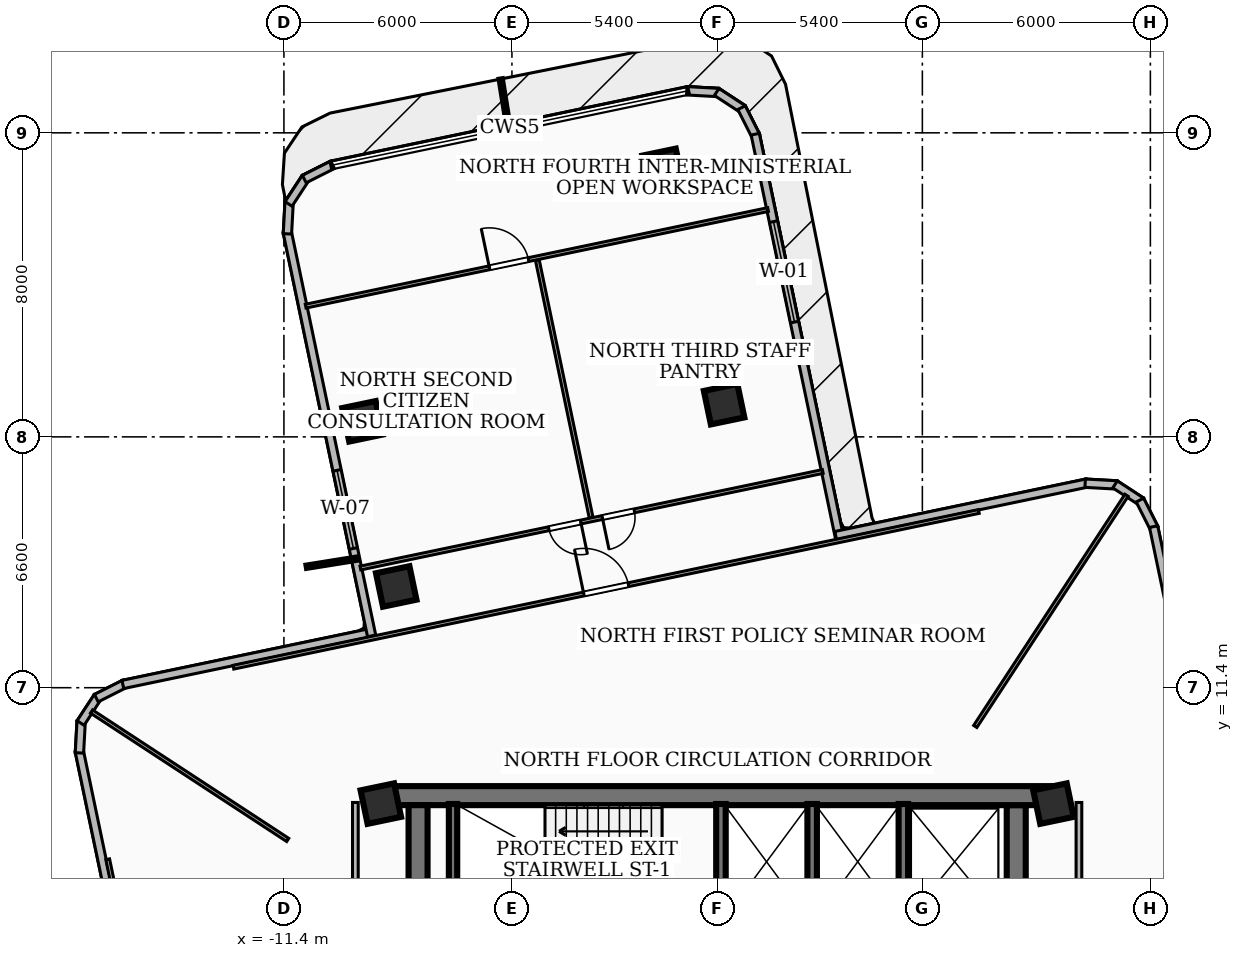
"""IFC4 building model, lengths in metres.
Left out: names, types, materials, properties, quantities, classifications, styles, units other than length and angle.
Written with IfcOpenShell. Run it as: python <this file> out.ifc"""

import sys

from ifc_helpers import new_model, si_unit, direction, frame, frame_2d, origin, origin_2d, place, context, subcontext, project, spatial, rectangle, extrude, element, fill, save


model = new_model("IFC4")
c1 = context("Model", 3, precision=1e-05, world=origin(), true_north=direction((0.0, 1.0)))
c2 = subcontext(c1, "Body", "Model", "MODEL_VIEW")
j1 = project(units=[si_unit("LENGTHUNIT", "METRE"), si_unit("PLANEANGLEUNIT", "RADIAN")], contexts=[c1])
p1 = place(None, origin())
s1 = spatial("IfcSite", under=j1, at=p1, CompositionType="ELEMENT")
p2 = place(p1, origin())
s2 = spatial("IfcBuilding", under=s1, at=p2, CompositionType="ELEMENT")
p3 = place(p2, frame((0.0, 0.0, 111.96)))
s3 = spatial("IfcBuildingStorey", under=s2, at=p3, CompositionType="ELEMENT", Elevation=111.96)
p4 = place(p3, frame((-8.78, 8.56, 0.0), z_axis=(0.0, 0.0, 1.0), x_axis=(1.0, 0.0, 0.0)))
e1 = element("IfcWall", 1, at=p4, inside=s3, PredefinedType="SHEAR", context=c2, shape_type="SweptSolid", body=[
    extrude(rectangle(XDim=17.56, YDim=0.5, at=frame_2d((8.78, 0.0))), origin(), (0.0, 0.0, 1.0), 4.06),
])
for number, where, z_axis, x_axis in (
    (2, (-7.87, 2.0, 0.0), (0.0, 0.0, 1.0), (0.0, 1.0, 0.0)),
    (3, (7.87, 8.31, 0.0), (0.0, 0.0, 1.0), (0.0, -1.0, 0.0)),
):
    element("IfcWall", number, at=place(p3, frame(where, z_axis=z_axis, x_axis=x_axis)), inside=s3, PredefinedType="SHEAR", context=c2, shape_type="SweptSolid", body=[
        extrude(rectangle(XDim=6.31, YDim=0.5, at=frame_2d((3.155, 0.0))), origin(), (0.0, 0.0, 1.0), 4.06),
    ])
p5 = place(p3, frame((-6.95, 5.28, 0.0), z_axis=(0.0, 0.0, 1.0), x_axis=(0.0, 1.0, 0.0)))
e4 = element("IfcWall", 4, at=p5, inside=s3, PredefinedType="SOLIDWALL", context=c2, shape_type="SweptSolid", body=[
    extrude(rectangle(XDim=3.06, YDim=0.22, at=frame_2d((1.53, 0.0))), origin(), (0.0, 0.0, 1.0), 4.06),
])
for number, where, z_axis, x_axis in (
    (5, (0.1, 5.3, 0.0), (0.0, 0.0, 1.0), (0.0, 1.0, 0.0)),
    (6, (2.5, 5.3, 0.0), (0.0, 0.0, 1.0), (0.0, 1.0, 0.0)),
    (7, (4.9, 5.3, 0.0), (0.0, 0.0, 1.0), (0.0, 1.0, 0.0)),
):
    element("IfcWall", number, at=place(p3, frame(where, z_axis=z_axis, x_axis=x_axis)), inside=s3, PredefinedType="SOLIDWALL", context=c2, shape_type="SweptSolid", body=[
        extrude(rectangle(XDim=3.04, YDim=0.25, at=frame_2d((1.52, 0.0))), origin(), (0.0, 0.0, 1.0), 4.06),
    ])
for number, where, z_axis, x_axis in (
    (8, (-8.85, 8.35, 0.0), (0.0, 0.0, 1.0), (0.979, 0.204, 0.0)),
    (9, (8.85, 8.35, 0.0), (0.0, 0.0, 1.0), (0.979, 0.204, 0.0)),
    (10, (0.183, 18.86, 0.0), (0.0, 0.0, 1.0), (0.979, 0.204, 0.0)),
    (11, (-8.445, 14.064, 0.0), (0.0, 0.0, 1.0), (0.979, 0.204, 0.0)),
    (12, (-1.437, 25.052, 0.0), (0.0, 0.0, 1.0), (0.979, 0.204, 0.0)),
    (13, (-9.333, 18.409, 0.0), (0.0, 0.0, 1.0), (0.979, 0.204, 0.0)),
):
    element("IfcColumn", number, at=place(p3, frame(where, z_axis=z_axis, x_axis=x_axis)), inside=s3, PredefinedType="COLUMN", context=c2, shape_type="SweptSolid", body=[
        extrude(rectangle(XDim=0.9, YDim=0.9, at=origin_2d()), origin(), (0.0, 0.0, 1.0), 4.32),
    ])
p6 = place(p3, frame((-15.403, 3.119, 0.0), z_axis=(0.0, 0.0, 1.0), x_axis=(-0.204509735336, 0.978864530031, 0.0)))
e14 = element("IfcWall", 14, at=p6, inside=s3, PredefinedType="SOLIDWALL", context=c2, shape_type="SweptSolid", body=[
    extrude(rectangle(XDim=6.757, YDim=0.22, at=frame_2d((3.378, 0.0))), origin(), (0.0, 0.0, 1.0), 4.06),
])
p7 = place(p3, frame((-16.781, 9.684, 0.0), z_axis=(0.0, 0.0, 1.0), x_axis=(0.055016197793, 0.998485462078, 0.0)))
e15 = element("IfcWall", 15, at=p7, inside=s3, PredefinedType="SOLIDWALL", context=c2, shape_type="SweptSolid", body=[
    extrude(rectangle(XDim=0.834, YDim=0.22, at=frame_2d((0.417, 0.0))), origin(), (0.0, 0.0, 1.0), 4.06),
])
p8 = place(p3, frame((-16.75, 10.471, 0.0), z_axis=(0.0, 0.0, 1.0), x_axis=(0.54760232045, 0.836738727822, 0.0)))
e16 = element("IfcWall", 16, at=p8, inside=s3, PredefinedType="SOLIDWALL", context=c2, shape_type="SweptSolid", body=[
    extrude(rectangle(XDim=0.82, YDim=0.22, at=frame_2d((0.41, 0.0))), origin(), (0.0, 0.0, 1.0), 4.06),
])
p9 = place(p3, frame((-16.337, 11.125, 0.0), z_axis=(0.0, 0.0, 1.0), x_axis=(0.892485652426, 0.45107578101, 0.0)))
e17 = element("IfcWall", 17, at=p9, inside=s3, PredefinedType="SOLIDWALL", context=c2, shape_type="SweptSolid", body=[
    extrude(rectangle(XDim=0.833, YDim=0.22, at=frame_2d((0.417, 0.0))), origin(), (0.0, 0.0, 1.0), 4.06),
])
p10 = place(p3, frame((-15.639, 11.485, 0.0), z_axis=(0.0, 0.0, 1.0), x_axis=(0.978870573598, 0.204480806295, 0.0)))
e18 = element("IfcWall", 18, at=p10, inside=s3, PredefinedType="SOLIDWALL", context=c2, shape_type="SweptSolid", body=[
    extrude(rectangle(XDim=6.758, YDim=0.22, at=frame_2d((3.379, 0.0))), origin(), (0.0, 0.0, 1.0), 4.06),
])
p11 = place(p3, frame((-9.092, 12.763, 0.0), z_axis=(0.0, 0.0, 1.0), x_axis=(-0.204463355867, 0.978874218737, 0.0)))
e19 = element("IfcWall", 19, at=p11, inside=s3, PredefinedType="SOLIDWALL", context=c2, shape_type="SweptSolid", body=[
    extrude(rectangle(XDim=10.858, YDim=0.22, at=frame_2d((5.429, 0.0))), origin(), (0.0, 0.0, 1.0), 4.06),
])
p12 = place(p11, frame((2.35, 0.0, 0.85)))
e20 = element("IfcOpeningElement", 20, at=p12, cuts=e19, PredefinedType="OPENING", context=c2, shape_type="SweptSolid", body=[
    extrude(rectangle(XDim=2.1, YDim=1.8, at=frame_2d((1.05, 0.9))), frame((0.0, 0.12, 0.0), z_axis=(0.0, -1.0, 0.0), x_axis=(1.0, 0.0, 0.0)), (0.0, 0.0, 1.0), 0.24),
])
p13 = place(p3, frame((-11.308, 23.342, 0.0), z_axis=(0.0, 0.0, 1.0), x_axis=(0.05414087393, 0.998533307291, 0.0)))
e21 = element("IfcWall", 21, at=p13, inside=s3, PredefinedType="SOLIDWALL", context=c2, shape_type="SweptSolid", body=[
    extrude(rectangle(XDim=0.834, YDim=0.22, at=frame_2d((0.417, 0.0))), origin(), (0.0, 0.0, 1.0), 4.06),
])
p14 = place(p3, frame((-11.278, 24.129, 0.0), z_axis=(0.0, 0.0, 1.0), x_axis=(0.548643443567, 0.836056440577, 0.0)))
e22 = element("IfcWall", 22, at=p14, inside=s3, PredefinedType="SOLIDWALL", context=c2, shape_type="SweptSolid", body=[
    extrude(rectangle(XDim=0.821, YDim=0.22, at=frame_2d((0.41, 0.0))), origin(), (0.0, 0.0, 1.0), 4.06),
])
p15 = place(p3, frame((-10.864, 24.783, 0.0), z_axis=(0.0, 0.0, 1.0), x_axis=(0.892957084524, 0.450141805655, 0.0)))
e23 = element("IfcWall", 23, at=p15, inside=s3, PredefinedType="SOLIDWALL", context=c2, shape_type="SweptSolid", body=[
    extrude(rectangle(XDim=0.833, YDim=0.22, at=frame_2d((0.417, 0.0))), origin(), (0.0, 0.0, 1.0), 4.06),
])
p16 = place(p3, frame((-0.799, 27.106, 0.0), z_axis=(0.0, 0.0, 1.0), x_axis=(0.998485462078, -0.055016197793, 0.0)))
e24 = element("IfcWall", 24, at=p16, inside=s3, PredefinedType="SOLIDWALL", context=c2, shape_type="SweptSolid", body=[
    extrude(rectangle(XDim=0.834, YDim=0.22, at=frame_2d((0.417, 0.0))), origin(), (0.0, 0.0, 1.0), 4.06),
])
p17 = place(p3, frame((-0.012, 27.075, 0.0), z_axis=(0.0, 0.0, 1.0), x_axis=(0.836738727822, -0.54760232045, 0.0)))
e25 = element("IfcWall", 25, at=p17, inside=s3, PredefinedType="SOLIDWALL", context=c2, shape_type="SweptSolid", body=[
    extrude(rectangle(XDim=0.82, YDim=0.22, at=frame_2d((0.41, 0.0))), origin(), (0.0, 0.0, 1.0), 4.06),
])
p18 = place(p3, frame((0.642, 26.662, 0.0), z_axis=(0.0, 0.0, 1.0), x_axis=(0.450957890046, -0.892545226532, 0.0)))
e26 = element("IfcWall", 26, at=p18, inside=s3, PredefinedType="SOLIDWALL", context=c2, shape_type="SweptSolid", body=[
    extrude(rectangle(XDim=0.834, YDim=0.22, at=frame_2d((0.417, 0.0))), origin(), (0.0, 0.0, 1.0), 4.06),
])
p19 = place(p3, frame((1.002, 25.964, 0.0), z_axis=(0.0, 0.0, 1.0), x_axis=(0.204531529625, -0.978859976396, 0.0)))
e27 = element("IfcWall", 27, at=p19, inside=s3, PredefinedType="SOLIDWALL", context=c2, shape_type="SweptSolid", body=[
    extrude(rectangle(XDim=10.859, YDim=0.22, at=frame_2d((5.429, 0.0))), origin(), (0.0, 0.0, 1.0), 3.29),
])
p20 = place(p19, frame((2.35, 0.0, 0.85)))
e28 = element("IfcOpeningElement", 28, at=p20, cuts=e27, PredefinedType="OPENING", context=c2, shape_type="SweptSolid", body=[
    extrude(rectangle(XDim=2.7, YDim=2.1, at=frame_2d((1.35, 1.05))), frame((0.0, 0.12, 0.0), z_axis=(0.0, -1.0, 0.0), x_axis=(1.0, 0.0, 0.0)), (0.0, 0.0, 1.0), 0.24),
])
p21 = place(p3, frame((3.119, 15.403, 0.0), z_axis=(0.0, 0.0, 1.0), x_axis=(0.978864530031, 0.204509735336, 0.0)))
e29 = element("IfcWall", 29, at=p21, inside=s3, PredefinedType="SOLIDWALL", context=c2, shape_type="SweptSolid", body=[
    extrude(rectangle(XDim=6.757, YDim=0.22, at=frame_2d((3.378, 0.0))), origin(), (0.0, 0.0, 1.0), 3.29),
])
p22 = place(p3, frame((9.684, 16.781, 0.0), z_axis=(0.0, 0.0, 1.0), x_axis=(0.998485462078, -0.055016197793, 0.0)))
e30 = element("IfcWall", 30, at=p22, inside=s3, PredefinedType="SOLIDWALL", context=c2, shape_type="SweptSolid", body=[
    extrude(rectangle(XDim=0.834, YDim=0.22, at=frame_2d((0.417, 0.0))), origin(), (0.0, 0.0, 1.0), 4.06),
])
p23 = place(p3, frame((10.471, 16.75, 0.0), z_axis=(0.0, 0.0, 1.0), x_axis=(0.836738727822, -0.54760232045, 0.0)))
e31 = element("IfcWall", 31, at=p23, inside=s3, PredefinedType="SOLIDWALL", context=c2, shape_type="SweptSolid", body=[
    extrude(rectangle(XDim=0.82, YDim=0.22, at=frame_2d((0.41, 0.0))), origin(), (0.0, 0.0, 1.0), 4.06),
])
p24 = place(p3, frame((11.125, 16.337, 0.0), z_axis=(0.0, 0.0, 1.0), x_axis=(0.45107578101, -0.892485652426, 0.0)))
e32 = element("IfcWall", 32, at=p24, inside=s3, PredefinedType="SOLIDWALL", context=c2, shape_type="SweptSolid", body=[
    extrude(rectangle(XDim=0.833, YDim=0.22, at=frame_2d((0.417, 0.0))), origin(), (0.0, 0.0, 1.0), 4.06),
])
p25 = place(p3, frame((11.485, 15.639, 0.0), z_axis=(0.0, 0.0, 1.0), x_axis=(0.204480806295, -0.978870573598, 0.0)))
e33 = element("IfcWall", 33, at=p25, inside=s3, PredefinedType="SOLIDWALL", context=c2, shape_type="SweptSolid", body=[
    extrude(rectangle(XDim=6.758, YDim=0.22, at=frame_2d((3.379, 0.0))), origin(), (0.0, 0.0, 1.0), 4.06),
])
for number, where, z_axis, x_axis in (
    (34, (-9.52, 1.75, 0.0), (0.0, 0.0, 1.0), (0.0, 1.0, 0.0)),
    (35, (9.52, 1.75, 0.0), (0.0, 0.0, 1.0), (0.0, 1.0, 0.0)),
):
    element("IfcWall", number, at=place(p3, frame(where, z_axis=z_axis, x_axis=x_axis)), inside=s3, PredefinedType="PARTITIONING", context=c2, shape_type="SweptSolid", body=[
        extrude(rectangle(XDim=6.63, YDim=0.15, at=frame_2d((3.315, 0.0))), origin(), (0.0, 0.0, 1.0), 3.29),
    ])
p26 = place(p3, frame((6.792, 10.38, 0.0), z_axis=(0.0, 0.0, 1.0), x_axis=(0.547596764532, 0.836742363858, 0.0)))
e36 = element("IfcWall", 36, at=p26, inside=s3, PredefinedType="PARTITIONING", context=c2, shape_type="SweptSolid", body=[
    extrude(rectangle(XDim=7.27, YDim=0.1, at=frame_2d((3.635, 0.0))), origin(), (0.0, 0.0, 1.0), 3.29),
])
p27 = place(p3, frame((-11.3, 7.394, 0.0), z_axis=(0.0, 0.0, 1.0), x_axis=(-0.836731843599, 0.547612839429, 0.0)))
e37 = element("IfcWall", 37, at=p27, inside=s3, PredefinedType="PARTITIONING", context=c2, shape_type="SweptSolid", body=[
    extrude(rectangle(XDim=6.17, YDim=0.1, at=frame_2d((3.085, 0.0))), origin(), (0.0, 0.0, 1.0), 4.06),
])
p28 = place(p3, frame((-12.73, 11.939, 0.0), z_axis=(0.0, 0.0, 1.0), x_axis=(0.978865834839, 0.204503489908, 0.0)))
e38 = element("IfcWall", 38, at=p28, inside=s3, PredefinedType="PARTITIONING", context=c2, shape_type="SweptSolid", body=[
    extrude(rectangle(XDim=20.04, YDim=0.1, at=frame_2d((10.02, 0.0))), origin(), (0.0, 0.0, 1.0), 3.29),
])
p29 = place(p28, frame((9.42, 0.0, 0.0)))
e39 = element("IfcOpeningElement", 39, at=p29, cuts=e38, PredefinedType="OPENING", context=c2, shape_type="SweptSolid", body=[
    extrude(rectangle(XDim=1.2, YDim=2.1, at=frame_2d((0.6, 1.05))), frame((0.0, 0.06, 0.0), z_axis=(0.0, -1.0, 0.0), x_axis=(1.0, 0.0, 0.0)), (0.0, 0.0, 1.0), 0.12),
])
p30 = place(p3, frame((-3.317, 15.877, 0.0), z_axis=(0.0, 0.0, 1.0), x_axis=(-0.204481130679, 0.978870505836, 0.0)))
e40 = element("IfcWall", 40, at=p30, inside=s3, PredefinedType="PARTITIONING", context=c2, shape_type="SweptSolid", body=[
    extrude(rectangle(XDim=6.92, YDim=0.1, at=frame_2d((3.46, 0.0))), origin(), (0.0, 0.0, 1.0), 3.44),
])
p31 = place(p3, frame((2.779, 17.089, 0.0), z_axis=(0.0, 0.0, 1.0), x_axis=(-0.978880294364, -0.204434266469, 0.0)))
e41 = element("IfcWall", 41, at=p31, inside=s3, PredefinedType="PARTITIONING", context=c2, shape_type="SweptSolid", body=[
    extrude(rectangle(XDim=12.429, YDim=0.1, at=frame_2d((6.215, 0.0))), origin(), (0.0, 0.0, 1.0), 3.29),
])
p32 = place(p31, frame((5.065, 0.0, 0.0)))
e42 = element("IfcOpeningElement", 42, at=p32, cuts=e41, PredefinedType="OPENING", context=c2, shape_type="SweptSolid", body=[
    extrude(rectangle(XDim=0.86, YDim=2.04, at=frame_2d((0.43, 1.02))), frame((0.0, 0.06, 0.0), z_axis=(0.0, -1.0, 0.0), x_axis=(1.0, 0.0, 0.0)), (0.0, 0.0, 1.0), 0.12),
])
p33 = place(p31, frame((6.505, 0.0, 0.0)))
e43 = element("IfcOpeningElement", 43, at=p33, cuts=e41, PredefinedType="OPENING", context=c2, shape_type="SweptSolid", body=[
    extrude(rectangle(XDim=0.86, YDim=2.04, at=frame_2d((0.43, 1.02))), frame((0.0, 0.06, 0.0), z_axis=(0.0, -1.0, 0.0), x_axis=(1.0, 0.0, 0.0)), (0.0, 0.0, 1.0), 0.12),
])
p34 = place(p3, frame((-10.828, 21.439, 0.0), z_axis=(0.0, 0.0, 1.0), x_axis=(0.978864568929, 0.204509549155, 0.0)))
e44 = element("IfcWall", 44, at=p34, inside=s3, PredefinedType="PARTITIONING", context=c2, shape_type="SweptSolid", body=[
    extrude(rectangle(XDim=12.43, YDim=0.1, at=frame_2d((6.215, 0.0))), origin(), (0.0, 0.0, 1.0), 3.29),
])
p35 = place(p34, frame((4.94, 0.0, 0.0)))
e45 = element("IfcOpeningElement", 45, at=p35, cuts=e44, PredefinedType="OPENING", context=c2, shape_type="SweptSolid", body=[
    extrude(rectangle(XDim=1.05, YDim=2.08, at=frame_2d((0.525, 1.04))), frame((0.0, 0.06, 0.0), z_axis=(0.0, -1.0, 0.0), x_axis=(1.0, 0.0, 0.0)), (0.0, 0.0, 1.0), 0.12),
])
p36 = place(p3, frame((-11.939, -12.73, 0.0), z_axis=(0.0, 0.0, 1.0), x_axis=(-0.204503489908, 0.978865834839, 0.0)))
e46 = element("IfcWall", 46, at=p36, inside=s3, PredefinedType="PARTITIONING", context=c2, shape_type="SweptSolid", body=[
    extrude(rectangle(XDim=20.04, YDim=0.1, at=frame_2d((10.02, 0.0))), origin(), (0.0, 0.0, 1.0), 3.29),
])
p37 = place(p36, frame((9.42, 0.0, 0.0)))
e47 = element("IfcOpeningElement", 47, at=p37, cuts=e46, PredefinedType="OPENING", context=c2, shape_type="SweptSolid", body=[
    extrude(rectangle(XDim=1.2, YDim=2.1, at=frame_2d((0.6, 1.05))), frame((0.0, 0.06, 0.0), z_axis=(0.0, -1.0, 0.0), x_axis=(1.0, 0.0, 0.0)), (0.0, 0.0, 1.0), 0.12),
])
p38 = place(p12, origin())
e48 = element("IfcWindow", 48, at=p38, inside=s3, PartitioningType="SINGLE_PANEL", PredefinedType="WINDOW", context=c2, shape_type="SweptSolid", body=[
    extrude(rectangle(XDim=2.1, YDim=1.8, at=frame_2d((1.05, 0.9))), frame((0.0, 0.03, 0.0), z_axis=(0.0, -1.0, 0.0), x_axis=(1.0, 0.0, 0.0)), (0.0, 0.0, 1.0), 0.06),
])
fill(e20, e48)
p39 = place(p20, origin())
e49 = element("IfcWindow", 49, at=p39, inside=s3, PartitioningType="SINGLE_PANEL", PredefinedType="WINDOW", context=c2, shape_type="SweptSolid", body=[
    extrude(rectangle(XDim=2.7, YDim=2.1, at=frame_2d((1.35, 1.05))), frame((0.0, 0.03, 0.0), z_axis=(0.0, -1.0, 0.0), x_axis=(1.0, 0.0, 0.0)), (0.0, 0.0, 1.0), 0.06),
])
fill(e28, e49)
p40 = place(p29, origin())
e50 = element("IfcDoor", 50, at=p40, inside=s3, OperationType="SINGLE_SWING_LEFT", PredefinedType="DOOR", context=c2, shape_type="SweptSolid", body=[
    extrude(rectangle(XDim=1.2, YDim=2.1, at=frame_2d((0.6, 1.05))), frame((0.0, 0.025, 0.0), z_axis=(0.0, -1.0, 0.0), x_axis=(1.0, 0.0, 0.0)), (0.0, 0.0, 1.0), 0.05),
])
fill(e39, e50)
p41 = place(p32, origin())
e51 = element("IfcDoor", 51, at=p41, inside=s3, OperationType="SINGLE_SWING_RIGHT", PredefinedType="DOOR", context=c2, shape_type="SweptSolid", body=[
    extrude(rectangle(XDim=0.86, YDim=2.04, at=frame_2d((0.43, 1.02))), frame((0.0, 0.025, 0.0), z_axis=(0.0, -1.0, 0.0), x_axis=(1.0, 0.0, 0.0)), (0.0, 0.0, 1.0), 0.05),
])
fill(e42, e51)
p42 = place(p33, origin())
e52 = element("IfcDoor", 52, at=p42, inside=s3, OperationType="SINGLE_SWING_LEFT", PredefinedType="DOOR", context=c2, shape_type="SweptSolid", body=[
    extrude(rectangle(XDim=0.86, YDim=2.04, at=frame_2d((0.43, 1.02))), frame((0.0, 0.025, 0.0), z_axis=(0.0, -1.0, 0.0), x_axis=(1.0, 0.0, 0.0)), (0.0, 0.0, 1.0), 0.05),
])
fill(e43, e52)
p43 = place(p35, origin())
e53 = element("IfcDoor", 53, at=p43, inside=s3, OperationType="SINGLE_SWING_LEFT", PredefinedType="DOOR", context=c2, shape_type="SweptSolid", body=[
    extrude(rectangle(XDim=1.05, YDim=2.08, at=frame_2d((0.525, 1.04))), frame((0.0, 0.025, 0.0), z_axis=(0.0, -1.0, 0.0), x_axis=(1.0, 0.0, 0.0)), (0.0, 0.0, 1.0), 0.05),
])
fill(e45, e53)
save(model, sys.argv[1])
